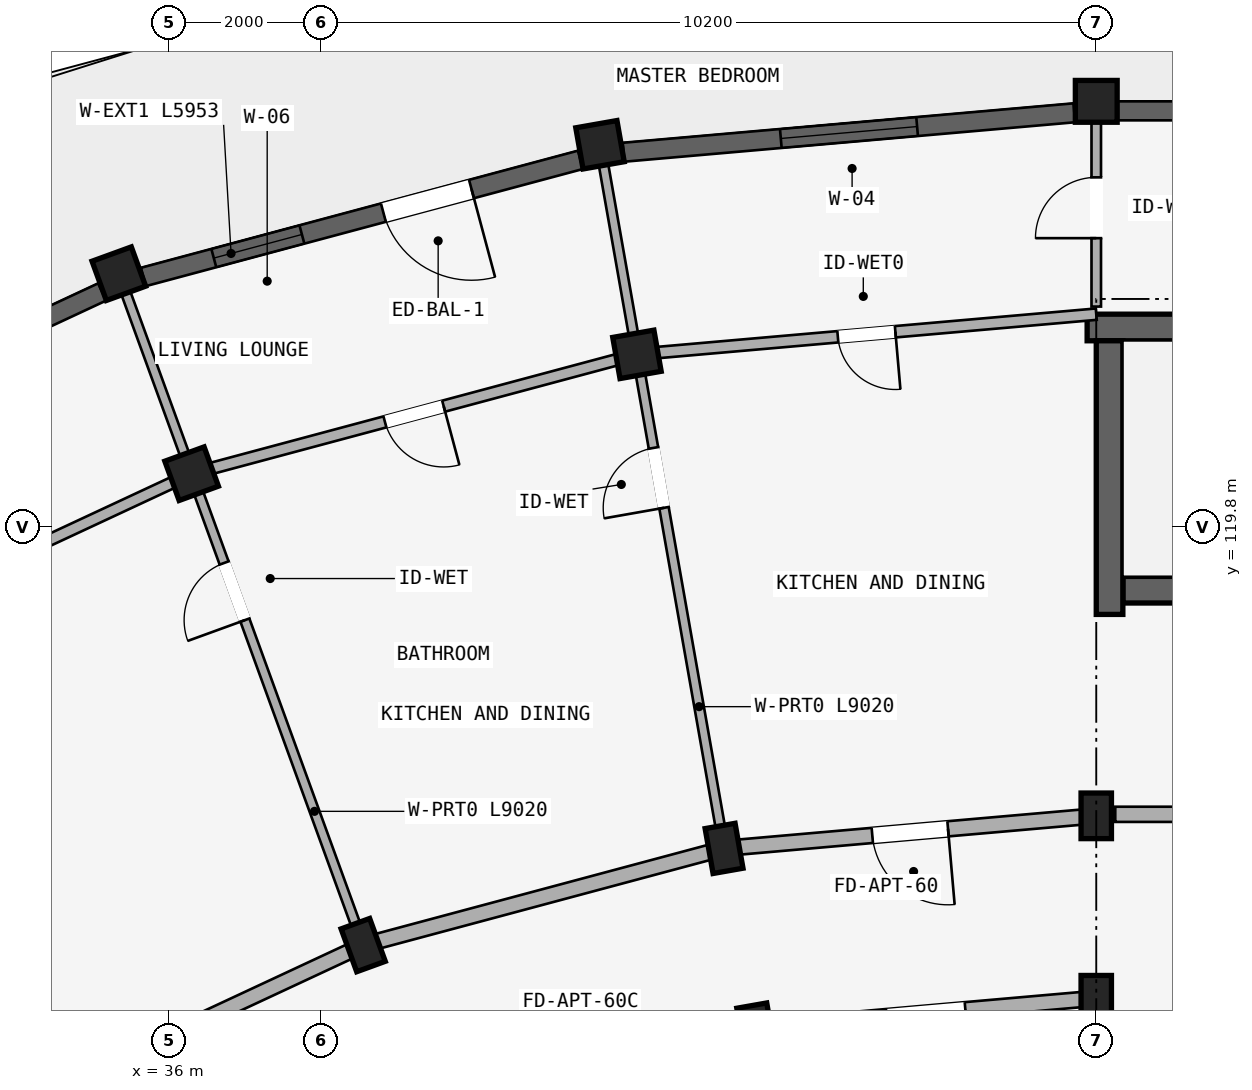
"""IFC4 building model, lengths in metres.
Left out: names, types, materials, properties, quantities, classifications, styles, units other than length and angle.
Written with IfcOpenShell. Run it as: python <this file> out.ifc"""

import sys

from ifc_helpers import new_model, si_unit, direction, frame, frame_2d, origin, origin_2d, place, context, subcontext, project, spatial, rectangle, extrude, element, fill, save


model = new_model("IFC4")
c1 = context("Model", 3, precision=1e-05, world=origin(), true_north=direction((0.0, 1.0)))
c2 = subcontext(c1, "Body", "Model", "MODEL_VIEW")
j1 = project(units=[si_unit("LENGTHUNIT", "METRE"), si_unit("PLANEANGLEUNIT", "RADIAN")], contexts=[c1])
p1 = place(None, origin())
s1 = spatial("IfcSite", under=j1, at=p1, CompositionType="ELEMENT")
p2 = place(p1, origin())
s2 = spatial("IfcBuilding", under=s1, at=p2, CompositionType="ELEMENT")
p3 = place(p2, frame((0.0, 0.0, 46.5)))
s3 = spatial("IfcBuildingStorey", under=s2, at=p3, CompositionType="ELEMENT", Elevation=46.5)
p4 = place(p3, frame((48.08, 122.425, 0.0), z_axis=(0.0, 0.0, 1.0), x_axis=(1.0, 0.0, 0.0)))
e1 = element("IfcWall", 1, at=p4, inside=s3, PredefinedType="SHEAR", context=c2, shape_type="SweptSolid", body=[
    extrude(rectangle(XDim=8.545, YDim=0.35, at=frame_2d((4.272, 0.0))), origin(), (0.0, 0.0, 1.0), 2.93),
])
p5 = place(p3, frame((48.55, 118.975, 0.0), z_axis=(0.0, 0.0, 1.0), x_axis=(1.0, 0.0, 0.0)))
e2 = element("IfcWall", 2, at=p5, inside=s3, PredefinedType="SHEAR", context=c2, shape_type="SweptSolid", body=[
    extrude(rectangle(XDim=8.075, YDim=0.35, at=frame_2d((4.038, 0.0))), origin(), (0.0, 0.0, 1.0), 2.93),
])
p6 = place(p5, frame((6.38, 0.0, 0.0)))
e3 = element("IfcOpeningElement", 3, at=p6, cuts=e2, PredefinedType="OPENING", context=c2, shape_type="SweptSolid", body=[
    extrude(rectangle(XDim=1.24, YDim=2.15, at=frame_2d((0.62, 1.075))), frame((0.0, 0.185, 0.0), z_axis=(0.0, -1.0, 0.0), x_axis=(1.0, 0.0, 0.0)), (0.0, 0.0, 1.0), 0.37),
])
p7 = place(p3, frame((48.375, 118.65, 0.0), z_axis=(0.0, 0.0, 1.0), x_axis=(0.0, 1.0, 0.0)))
e4 = element("IfcWall", 4, at=p7, inside=s3, PredefinedType="SHEAR", context=c2, shape_type="SweptSolid", body=[
    extrude(rectangle(XDim=3.6, YDim=0.35, at=frame_2d((1.8, 0.0))), origin(), (0.0, 0.0, 1.0), 2.93),
])
for number, where, z_axis, x_axis in (
    (5, (48.2, 113.6, 0.0), (0.0, 0.0, 1.0), (1.0, 0.0, 0.0)),
    (6, (48.2, 116.0, 0.0), (0.0, 0.0, 1.0), (1.0, 0.0, 0.0)),
):
    element("IfcColumn", number, at=place(p3, frame(where, z_axis=z_axis, x_axis=x_axis)), inside=s3, PredefinedType="COLUMN", context=c2, shape_type="SweptSolid", body=[
        extrude(rectangle(XDim=0.4, YDim=0.6, at=origin_2d()), origin(), (0.0, 0.0, 1.0), 2.93),
    ])
p8 = place(p3, frame((48.2, 125.4, 0.0), z_axis=(0.0, 0.0, 1.0), x_axis=(1.0, 0.0, 0.0)))
e7 = element("IfcColumn", 7, at=p8, inside=s3, PredefinedType="COLUMN", context=c2, shape_type="SweptSolid", body=[
    extrude(rectangle(XDim=0.55, YDim=0.55, at=origin_2d()), origin(), (0.0, 0.0, 1.0), 2.97),
])
for number, where, z_axis, x_axis in (
    (8, (43.72, 113.208, 0.0), (0.0, 0.0, 1.0), (0.985, 0.174, 0.0)),
    (9, (43.303, 115.572, 0.0), (0.0, 0.0, 1.0), (0.985, 0.174, 0.0)),
):
    element("IfcColumn", number, at=place(p3, frame(where, z_axis=z_axis, x_axis=x_axis)), inside=s3, PredefinedType="COLUMN", context=c2, shape_type="SweptSolid", body=[
        extrude(rectangle(XDim=0.4, YDim=0.6, at=origin_2d()), origin(), (0.0, 0.0, 1.0), 2.93),
    ])
p9 = place(p3, frame((42.157, 122.071, 0.0), z_axis=(0.0, 0.0, 1.0), x_axis=(0.984807753012, 0.173648177667, 0.0)))
e10 = element("IfcColumn", 10, at=p9, inside=s3, PredefinedType="COLUMN", context=c2, shape_type="SweptSolid", body=[
    extrude(rectangle(XDim=0.55, YDim=0.55, at=origin_2d()), origin(), (0.0, 0.0, 1.0), 2.93),
])
p10 = place(p3, frame((41.671, 124.829, 0.0), z_axis=(0.0, 0.0, 1.0), x_axis=(0.984807753012, 0.173648177667, 0.0)))
e11 = element("IfcColumn", 11, at=p10, inside=s3, PredefinedType="COLUMN", context=c2, shape_type="SweptSolid", body=[
    extrude(rectangle(XDim=0.55, YDim=0.55, at=origin_2d()), origin(), (0.0, 0.0, 1.0), 2.97),
])
p11 = place(p3, frame((38.555, 114.299, 0.0), z_axis=(0.0, 0.0, 1.0), x_axis=(0.939692620786, 0.342020143326, 0.0)))
e12 = element("IfcColumn", 12, at=p11, inside=s3, PredefinedType="COLUMN", context=c2, shape_type="SweptSolid", body=[
    extrude(rectangle(XDim=0.4, YDim=0.6, at=origin_2d()), origin(), (0.0, 0.0, 1.0), 2.93),
])
p12 = place(p3, frame((36.298, 120.501, 0.0), z_axis=(0.0, 0.0, 1.0), x_axis=(0.939692620786, 0.342020143326, 0.0)))
e13 = element("IfcColumn", 13, at=p12, inside=s3, PredefinedType="COLUMN", context=c2, shape_type="SweptSolid", body=[
    extrude(rectangle(XDim=0.55, YDim=0.55, at=origin_2d()), origin(), (0.0, 0.0, 1.0), 2.93),
])
p13 = place(p3, frame((35.34, 123.132, 0.0), z_axis=(0.0, 0.0, 1.0), x_axis=(0.939692620786, 0.342020143326, 0.0)))
e14 = element("IfcColumn", 14, at=p13, inside=s3, PredefinedType="COLUMN", context=c2, shape_type="SweptSolid", body=[
    extrude(rectangle(XDim=0.55, YDim=0.55, at=origin_2d()), origin(), (0.0, 0.0, 1.0), 2.97),
])
p14 = place(p3, frame((48.45, 116.02, 0.0), z_axis=(0.0, 0.0, 1.0), x_axis=(1.0, 0.0, 0.0)))
e15 = element("IfcWall", 15, at=p14, inside=s3, PredefinedType="STANDARD", context=c2, shape_type="SweptSolid", body=[
    extrude(rectangle(XDim=5.25, YDim=0.2, at=frame_2d((2.625, 0.0))), origin(), (0.0, 0.0, 1.0), 2.372),
])
p15 = place(p14, frame((2.165, 0.0, 0.0)))
e16 = element("IfcOpeningElement", 16, at=p15, cuts=e15, PredefinedType="OPENING", context=c2, shape_type="SweptSolid", body=[
    extrude(rectangle(XDim=0.92, YDim=2.1, at=frame_2d((0.46, 1.05))), frame((0.0, 0.11, 0.0), z_axis=(0.0, -1.0, 0.0), x_axis=(1.0, 0.0, 0.0)), (0.0, 0.0, 1.0), 0.22),
])
p16 = place(p3, frame((48.2, 113.6, 0.0), z_axis=(0.0, 0.0, 1.0), x_axis=(-0.996191949488, -0.087187153726, 0.0)))
e17 = element("IfcWall", 17, at=p16, inside=s3, PredefinedType="STANDARD", context=c2, shape_type="SweptSolid", body=[
    extrude(rectangle(XDim=4.497, YDim=0.2, at=frame_2d((2.249, 0.0))), origin(), (0.0, 0.0, 1.0), 2.372),
])
p17 = place(p16, frame((1.729, 0.0, 0.0)))
e18 = element("IfcOpeningElement", 18, at=p17, cuts=e17, PredefinedType="OPENING", context=c2, shape_type="SweptSolid", body=[
    extrude(rectangle(XDim=1.04, YDim=2.15, at=frame_2d((0.52, 1.075))), frame((0.0, 0.11, 0.0), z_axis=(0.0, -1.0, 0.0), x_axis=(1.0, 0.0, 0.0)), (0.0, 0.0, 1.0), 0.22),
])
p18 = place(p3, frame((48.2, 116.0, 0.0), z_axis=(0.0, 0.0, 1.0), x_axis=(-0.996193663584, -0.087167566415, 0.0)))
e19 = element("IfcWall", 19, at=p18, inside=s3, PredefinedType="STANDARD", context=c2, shape_type="SweptSolid", body=[
    extrude(rectangle(XDim=4.916, YDim=0.2, at=frame_2d((2.458, 0.0))), origin(), (0.0, 0.0, 1.0), 2.372),
])
p19 = place(p18, frame((1.958, 0.0, 0.0)))
e20 = element("IfcOpeningElement", 20, at=p19, cuts=e19, PredefinedType="OPENING", context=c2, shape_type="SweptSolid", body=[
    extrude(rectangle(XDim=1.0, YDim=2.15, at=frame_2d((0.5, 1.075))), frame((0.0, 0.11, 0.0), z_axis=(0.0, -1.0, 0.0), x_axis=(1.0, 0.0, 0.0)), (0.0, 0.0, 1.0), 0.22),
])
p20 = place(p3, frame((43.303, 115.572, 0.0), z_axis=(0.0, 0.0, 1.0), x_axis=(-0.965930095386, -0.258803112091, 0.0)))
e21 = element("IfcWall", 21, at=p20, inside=s3, PredefinedType="STANDARD", context=c2, shape_type="SweptSolid", body=[
    extrude(rectangle(XDim=4.916, YDim=0.2, at=frame_2d((2.458, 0.0))), origin(), (0.0, 0.0, 1.0), 2.372),
])
p21 = place(p3, frame((38.555, 114.299, 0.0), z_axis=(0.0, 0.0, 1.0), x_axis=(-0.906302381024, -0.422629854778, 0.0)))
e22 = element("IfcWall", 22, at=p21, inside=s3, PredefinedType="STANDARD", context=c2, shape_type="SweptSolid", body=[
    extrude(rectangle(XDim=4.915, YDim=0.2, at=frame_2d((2.458, 0.0))), origin(), (0.0, 0.0, 1.0), 2.372),
])
p22 = place(p3, frame((48.2, 110.35, 0.0), z_axis=(0.0, 0.0, 1.0), x_axis=(0.0, 1.0, 0.0)))
e23 = element("IfcWall", 23, at=p22, inside=s3, PredefinedType="STANDARD", context=c2, shape_type="SweptSolid", body=[
    extrude(rectangle(XDim=3.2, YDim=0.22, at=frame_2d((1.6, 0.0))), origin(), (0.0, 0.0, 1.0), 2.372),
])
p23 = place(p3, frame((48.2, 122.7, 0.0), z_axis=(0.0, 0.0, 1.0), x_axis=(0.0, 1.0, 0.0)))
e24 = element("IfcWall", 24, at=p23, inside=s3, PredefinedType="PARTITIONING", context=c2, shape_type="SweptSolid", body=[
    extrude(rectangle(XDim=2.42, YDim=0.125, at=frame_2d((1.21, 0.0))), origin(), (0.0, 0.0, 1.0), 2.372),
])
p24 = place(p23, frame((0.9, 0.0, 0.0)))
e25 = element("IfcOpeningElement", 25, at=p24, cuts=e24, PredefinedType="OPENING", context=c2, shape_type="SweptSolid", body=[
    extrude(rectangle(XDim=0.8, YDim=2.1, at=frame_2d((0.4, 1.05))), frame((0.0, 0.073, 0.0), z_axis=(0.0, -1.0, 0.0), x_axis=(1.0, 0.0, 0.0)), (0.0, 0.0, 1.0), 0.145),
])
p25 = place(p3, frame((43.286, 115.67, 0.0), z_axis=(0.0, 0.0, 1.0), x_axis=(-0.173635554464, 0.98480997874, 0.0)))
e26 = element("IfcWall", 26, at=p25, inside=s3, PredefinedType="PARTITIONING", context=c2, shape_type="SweptSolid", body=[
    extrude(rectangle(XDim=9.02, YDim=0.125, at=frame_2d((4.51, 0.0))), origin(), (0.0, 0.0, 1.0), 2.372),
])
p26 = place(p25, frame((4.45, 0.0, 0.0)))
e27 = element("IfcOpeningElement", 27, at=p26, cuts=e26, PredefinedType="OPENING", context=c2, shape_type="SweptSolid", body=[
    extrude(rectangle(XDim=0.8, YDim=2.1, at=frame_2d((0.4, 1.05))), frame((0.0, 0.073, 0.0), z_axis=(0.0, -1.0, 0.0), x_axis=(1.0, 0.0, 0.0)), (0.0, 0.0, 1.0), 0.145),
])
p27 = place(p3, frame((38.521, 114.393, 0.0), z_axis=(0.0, 0.0, 1.0), x_axis=(-0.342012528828, 0.939695392201, 0.0)))
e28 = element("IfcWall", 28, at=p27, inside=s3, PredefinedType="PARTITIONING", context=c2, shape_type="SweptSolid", body=[
    extrude(rectangle(XDim=9.02, YDim=0.125, at=frame_2d((4.51, 0.0))), origin(), (0.0, 0.0, 1.0), 2.372),
])
p28 = place(p27, frame((4.45, 0.0, 0.0)))
e29 = element("IfcOpeningElement", 29, at=p28, cuts=e28, PredefinedType="OPENING", context=c2, shape_type="SweptSolid", body=[
    extrude(rectangle(XDim=0.8, YDim=2.1, at=frame_2d((0.4, 1.05))), frame((0.0, 0.073, 0.0), z_axis=(0.0, -1.0, 0.0), x_axis=(1.0, 0.0, 0.0)), (0.0, 0.0, 1.0), 0.145),
])
p29 = place(p3, frame((48.2, 122.6, 0.0), z_axis=(0.0, 0.0, 1.0), x_axis=(-0.996193018494, -0.087174938512, 0.0)))
e30 = element("IfcWall", 30, at=p29, inside=s3, PredefinedType="PLUMBINGWALL", context=c2, shape_type="SweptSolid", body=[
    extrude(rectangle(XDim=6.066, YDim=0.15, at=frame_2d((3.033, 0.0))), origin(), (0.0, 0.0, 1.0), 2.372),
])
p30 = place(p29, frame((2.653, 0.0, 0.0)))
e31 = element("IfcOpeningElement", 31, at=p30, cuts=e30, PredefinedType="OPENING", context=c2, shape_type="SweptSolid", body=[
    extrude(rectangle(XDim=0.76, YDim=2.05, at=frame_2d((0.38, 1.025))), frame((0.0, 0.085, 0.0), z_axis=(0.0, -1.0, 0.0), x_axis=(1.0, 0.0, 0.0)), (0.0, 0.0, 1.0), 0.17),
])
p31 = place(p3, frame((42.157, 122.071, 0.0), z_axis=(0.0, 0.0, 1.0), x_axis=(-0.965923618901, -0.258827283048, 0.0)))
e32 = element("IfcWall", 32, at=p31, inside=s3, PredefinedType="PLUMBINGWALL", context=c2, shape_type="SweptSolid", body=[
    extrude(rectangle(XDim=6.066, YDim=0.15, at=frame_2d((3.033, 0.0))), origin(), (0.0, 0.0, 1.0), 2.372),
])
p32 = place(p31, frame((2.633, 0.0, 0.0)))
e33 = element("IfcOpeningElement", 33, at=p32, cuts=e32, PredefinedType="OPENING", context=c2, shape_type="SweptSolid", body=[
    extrude(rectangle(XDim=0.8, YDim=2.1, at=frame_2d((0.4, 1.05))), frame((0.0, 0.085, 0.0), z_axis=(0.0, -1.0, 0.0), x_axis=(1.0, 0.0, 0.0)), (0.0, 0.0, 1.0), 0.17),
])
p33 = place(p3, frame((36.298, 120.501, 0.0), z_axis=(0.0, 0.0, 1.0), x_axis=(-0.906312656069, -0.42260781991, 0.0)))
e34 = element("IfcWall", 34, at=p33, inside=s3, PredefinedType="PLUMBINGWALL", context=c2, shape_type="SweptSolid", body=[
    extrude(rectangle(XDim=6.066, YDim=0.15, at=frame_2d((3.033, 0.0))), origin(), (0.0, 0.0, 1.0), 2.372),
])
p34 = place(p33, frame((2.613, 0.0, 0.0)))
e35 = element("IfcOpeningElement", 35, at=p34, cuts=e34, PredefinedType="OPENING", context=c2, shape_type="SweptSolid", body=[
    extrude(rectangle(XDim=0.84, YDim=2.1, at=frame_2d((0.42, 1.05))), frame((0.0, 0.085, 0.0), z_axis=(0.0, -1.0, 0.0), x_axis=(1.0, 0.0, 0.0)), (0.0, 0.0, 1.0), 0.17),
])
p35 = place(p3, frame((47.911, 125.249, 0.0), z_axis=(0.0, 0.0, 1.0), x_axis=(-0.996195052879, -0.087151687417, 0.0)))
e36 = element("IfcWall", 36, at=p35, inside=s3, PredefinedType="STANDARD", context=c2, shape_type="SweptSolid", body=[
    extrude(rectangle(XDim=5.953, YDim=0.25, at=frame_2d((2.977, 0.0))), origin(), (0.0, 0.0, 1.0), 2.48),
])
p36 = place(p35, frame((2.076, 0.0, 0.63)))
e37 = element("IfcOpeningElement", 37, at=p36, cuts=e36, PredefinedType="OPENING", context=c2, shape_type="SweptSolid", body=[
    extrude(rectangle(XDim=1.8, YDim=1.65, at=frame_2d((0.9, 0.825))), frame((0.0, 0.135, 0.0), z_axis=(0.0, -1.0, 0.0), x_axis=(1.0, 0.0, 0.0)), (0.0, 0.0, 1.0), 0.27),
])
p37 = place(p3, frame((41.413, 124.63, 0.0), z_axis=(0.0, 0.0, 1.0), x_axis=(-0.965925901434, -0.258818764656, 0.0)))
e38 = element("IfcWall", 38, at=p37, inside=s3, PredefinedType="STANDARD", context=c2, shape_type="SweptSolid", body=[
    extrude(rectangle(XDim=5.953, YDim=0.25, at=frame_2d((2.977, 0.0))), origin(), (0.0, 0.0, 1.0), 2.48),
])
p38 = place(p37, frame((3.793, 0.0, 0.38)))
e39 = element("IfcOpeningElement", 39, at=p38, cuts=e38, PredefinedType="OPENING", context=c2, shape_type="SweptSolid", body=[
    extrude(rectangle(XDim=1.2, YDim=1.5, at=frame_2d((0.6, 0.75))), frame((0.0, 0.135, 0.0), z_axis=(0.0, -1.0, 0.0), x_axis=(1.0, 0.0, 0.0)), (0.0, 0.0, 1.0), 0.27),
])
p39 = place(p37, frame((1.484, 0.0, 0.0)))
e40 = element("IfcOpeningElement", 40, at=p39, cuts=e38, PredefinedType="OPENING", context=c2, shape_type="SweptSolid", body=[
    extrude(rectangle(XDim=1.2, YDim=2.15, at=frame_2d((0.6, 1.075))), frame((0.0, 0.135, 0.0), z_axis=(0.0, -1.0, 0.0), x_axis=(1.0, 0.0, 0.0)), (0.0, 0.0, 1.0), 0.27),
])
p40 = place(p3, frame((35.12, 122.892, 0.0), z_axis=(0.0, 0.0, 1.0), x_axis=(-0.90629940826, -0.422636229619, 0.0)))
e41 = element("IfcWall", 41, at=p40, inside=s3, PredefinedType="STANDARD", context=c2, shape_type="SweptSolid", body=[
    extrude(rectangle(XDim=5.953, YDim=0.25, at=frame_2d((2.977, 0.0))), origin(), (0.0, 0.0, 1.0), 2.48),
])
p41 = place(p40, frame((2.027, 0.0, 0.53)))
e42 = element("IfcOpeningElement", 42, at=p41, cuts=e41, PredefinedType="OPENING", context=c2, shape_type="SweptSolid", body=[
    extrude(rectangle(XDim=1.9, YDim=1.75, at=frame_2d((0.95, 0.875))), frame((0.0, 0.135, 0.0), z_axis=(0.0, -1.0, 0.0), x_axis=(1.0, 0.0, 0.0)), (0.0, 0.0, 1.0), 0.27),
])
p42 = place(p3, frame((48.479, 125.275, 0.0), z_axis=(0.0, 0.0, 1.0), x_axis=(1.0, 0.0, 0.0)))
e43 = element("IfcWall", 43, at=p42, inside=s3, PredefinedType="STANDARD", context=c2, shape_type="SweptSolid", body=[
    extrude(rectangle(XDim=5.043, YDim=0.25, at=frame_2d((2.521, 0.0))), origin(), (0.0, 0.0, 1.0), 2.48),
])
p43 = place(p42, frame((2.046, 0.0, 0.88)))
e44 = element("IfcOpeningElement", 44, at=p43, cuts=e43, PredefinedType="OPENING", context=c2, shape_type="SweptSolid", body=[
    extrude(rectangle(XDim=0.95, YDim=1.35, at=frame_2d((0.475, 0.675))), frame((0.0, 0.135, 0.0), z_axis=(0.0, -1.0, 0.0), x_axis=(1.0, 0.0, 0.0)), (0.0, 0.0, 1.0), 0.27),
])
p44 = place(p36, origin())
e45 = element("IfcWindow", 45, at=p44, inside=s3, PartitioningType="DOUBLE_PANEL_VERTICAL", PredefinedType="WINDOW", context=c2, shape_type="SweptSolid", body=[
    extrude(rectangle(XDim=1.8, YDim=1.65, at=frame_2d((0.9, 0.825))), frame((0.0, 0.03, 0.0), z_axis=(0.0, -1.0, 0.0), x_axis=(1.0, 0.0, 0.0)), (0.0, 0.0, 1.0), 0.06),
])
fill(e37, e45)
p45 = place(p38, origin())
e46 = element("IfcWindow", 46, at=p45, inside=s3, PartitioningType="SINGLE_PANEL", PredefinedType="WINDOW", context=c2, shape_type="SweptSolid", body=[
    extrude(rectangle(XDim=1.2, YDim=1.5, at=frame_2d((0.6, 0.75))), frame((0.0, 0.03, 0.0), z_axis=(0.0, -1.0, 0.0), x_axis=(1.0, 0.0, 0.0)), (0.0, 0.0, 1.0), 0.06),
])
fill(e39, e46)
p46 = place(p24, origin())
e47 = element("IfcDoor", 47, at=p46, inside=s3, OperationType="SINGLE_SWING_LEFT", PredefinedType="DOOR", context=c2, shape_type="SweptSolid", body=[
    extrude(rectangle(XDim=0.8, YDim=2.1, at=frame_2d((0.4, 1.05))), frame((0.0, 0.025, 0.0), z_axis=(0.0, -1.0, 0.0), x_axis=(1.0, 0.0, 0.0)), (0.0, 0.0, 1.0), 0.05),
])
fill(e25, e47)
p47 = place(p26, frame((0.8, 0.0, 0.0), z_axis=(0.0, 0.0, 1.0), x_axis=(-1.0, 0.0, 0.0)))
e48 = element("IfcDoor", 48, at=p47, inside=s3, OperationType="SINGLE_SWING_RIGHT", PredefinedType="DOOR", context=c2, shape_type="SweptSolid", body=[
    extrude(rectangle(XDim=0.8, YDim=2.1, at=frame_2d((0.4, 1.05))), frame((0.0, 0.025, 0.0), z_axis=(0.0, -1.0, 0.0), x_axis=(1.0, 0.0, 0.0)), (0.0, 0.0, 1.0), 0.05),
])
fill(e27, e48)
p48 = place(p28, origin())
e49 = element("IfcDoor", 49, at=p48, inside=s3, OperationType="SINGLE_SWING_LEFT", PredefinedType="DOOR", context=c2, shape_type="SweptSolid", body=[
    extrude(rectangle(XDim=0.8, YDim=2.1, at=frame_2d((0.4, 1.05))), frame((0.0, 0.025, 0.0), z_axis=(0.0, -1.0, 0.0), x_axis=(1.0, 0.0, 0.0)), (0.0, 0.0, 1.0), 0.05),
])
fill(e29, e49)
p49 = place(p19, frame((1.0, 0.0, 0.0), z_axis=(0.0, 0.0, 1.0), x_axis=(-1.0, 0.0, 0.0)))
e50 = element("IfcDoor", 50, at=p49, inside=s3, OperationType="SINGLE_SWING_RIGHT", PredefinedType="DOOR", context=c2, shape_type="SweptSolid", body=[
    extrude(rectangle(XDim=1.0, YDim=2.15, at=frame_2d((0.5, 1.075))), frame((0.0, 0.025, 0.0), z_axis=(0.0, -1.0, 0.0), x_axis=(1.0, 0.0, 0.0)), (0.0, 0.0, 1.0), 0.05),
])
fill(e20, e50)
p50 = place(p30, origin())
e51 = element("IfcDoor", 51, at=p50, inside=s3, OperationType="SINGLE_SWING_LEFT", PredefinedType="DOOR", context=c2, shape_type="SweptSolid", body=[
    extrude(rectangle(XDim=0.76, YDim=2.05, at=frame_2d((0.38, 1.025))), frame((0.0, 0.025, 0.0), z_axis=(0.0, -1.0, 0.0), x_axis=(1.0, 0.0, 0.0)), (0.0, 0.0, 1.0), 0.05),
])
fill(e31, e51)
p51 = place(p32, frame((0.8, 0.0, 0.0), z_axis=(0.0, 0.0, 1.0), x_axis=(-1.0, 0.0, 0.0)))
e52 = element("IfcDoor", 52, at=p51, inside=s3, OperationType="SINGLE_SWING_RIGHT", PredefinedType="DOOR", context=c2, shape_type="SweptSolid", body=[
    extrude(rectangle(XDim=0.8, YDim=2.1, at=frame_2d((0.4, 1.05))), frame((0.0, 0.025, 0.0), z_axis=(0.0, -1.0, 0.0), x_axis=(1.0, 0.0, 0.0)), (0.0, 0.0, 1.0), 0.05),
])
fill(e33, e52)
p52 = place(p17, frame((1.04, 0.0, 0.0), z_axis=(0.0, 0.0, 1.0), x_axis=(-1.0, 0.0, 0.0)))
e53 = element("IfcDoor", 53, at=p52, inside=s3, OperationType="SINGLE_SWING_RIGHT", PredefinedType="DOOR", context=c2, shape_type="SweptSolid", body=[
    extrude(rectangle(XDim=1.04, YDim=2.15, at=frame_2d((0.52, 1.075))), frame((0.0, 0.025, 0.0), z_axis=(0.0, -1.0, 0.0), x_axis=(1.0, 0.0, 0.0)), (0.0, 0.0, 1.0), 0.05),
])
fill(e18, e53)
p53 = place(p39, frame((1.2, 0.0, 0.0), z_axis=(0.0, 0.0, 1.0), x_axis=(-1.0, 0.0, 0.0)))
e54 = element("IfcDoor", 54, at=p53, inside=s3, OperationType="SINGLE_SWING_RIGHT", PredefinedType="DOOR", context=c2, shape_type="SweptSolid", body=[
    extrude(rectangle(XDim=1.2, YDim=2.15, at=frame_2d((0.6, 1.075))), frame((0.0, 0.025, 0.0), z_axis=(0.0, -1.0, 0.0), x_axis=(1.0, 0.0, 0.0)), (0.0, 0.0, 1.0), 0.05),
])
fill(e40, e54)
save(model, sys.argv[1])
